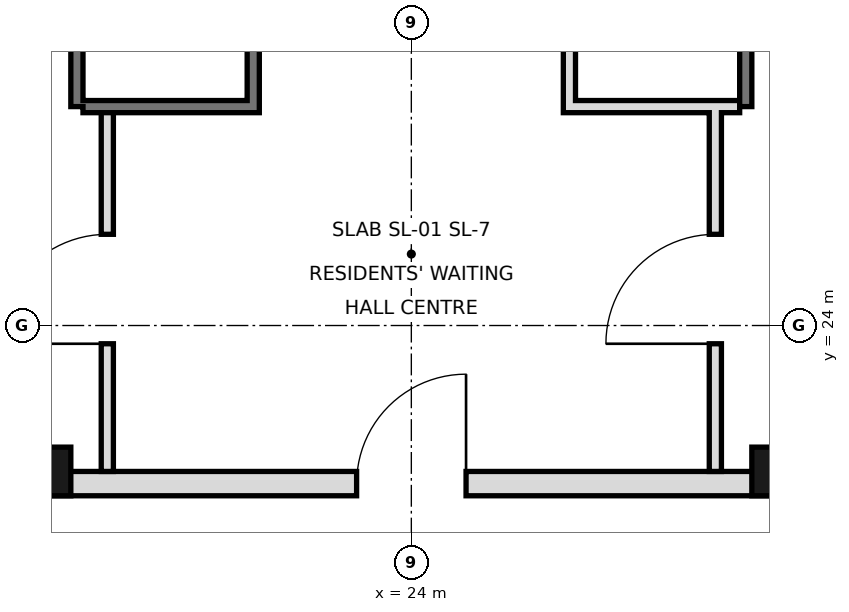
"""IFC4 building model, lengths in metres.
Left out: names, types, materials, properties, quantities, classifications, styles, units other than length and angle.
Written with IfcOpenShell. Run it as: python <this file> out.ifc"""

import sys

from ifc_helpers import new_model, si_unit, direction, frame, frame_2d, origin, origin_2d, place, context, subcontext, project, spatial, rectangle, hollow_rectangle, extrude, element, fill, save


model = new_model("IFC4")
c1 = context("Model", 3, precision=1e-05, world=origin(), true_north=direction((0.0, 1.0)))
c2 = subcontext(c1, "Body", "Model", "MODEL_VIEW")
j1 = project(units=[si_unit("LENGTHUNIT", "METRE"), si_unit("PLANEANGLEUNIT", "RADIAN")], contexts=[c1])
p1 = place(None, origin())
s1 = spatial("IfcSite", under=j1, at=p1, CompositionType="ELEMENT")
p2 = place(p1, origin())
s2 = spatial("IfcBuilding", under=s1, at=p2, CompositionType="ELEMENT")
p3 = place(p2, frame((0.0, 0.0, 126.8)))
s3 = spatial("IfcBuildingStorey", under=s2, at=p3, CompositionType="ELEMENT", Elevation=126.8)
for number, where, z_axis, x_axis in (
    (1, (18.0, 21.6, 0.0), (0.0, 0.0, 1.0), (1.0, 0.0, 0.0)),
    (2, (30.0, 21.6, 0.0), (0.0, 0.0, 1.0), (1.0, 0.0, 0.0)),
):
    element("IfcColumn", number, at=place(p3, frame(where, z_axis=z_axis, x_axis=x_axis)), inside=s3, PredefinedType="COLUMN", context=c2, shape_type="SweptSolid", body=[
        extrude(hollow_rectangle(XDim=0.8, YDim=0.8, WallThickness=0.05, at=origin_2d()), origin(), (0.0, 0.0, 1.0), 3.6),
    ])
for number, where, z_axis, x_axis in (
    (3, (18.5, 27.6, 0.0), (0.0, 0.0, 1.0), (0.0, 1.0, 0.0)),
    (4, (29.5, 27.6, 0.0), (0.0, 0.0, 1.0), (0.0, 1.0, 0.0)),
):
    element("IfcWall", number, at=place(p3, frame(where, z_axis=z_axis, x_axis=x_axis)), inside=s3, PredefinedType="SOLIDWALL", context=c2, shape_type="SweptSolid", body=[
        extrude(rectangle(XDim=17.5, YDim=0.2, at=frame_2d((8.75, 0.0))), origin(), (0.0, 0.0, 1.0), 3.42),
    ])
p4 = place(p3, frame((5.6, 21.4, 0.0), z_axis=(0.0, 0.0, 1.0), x_axis=(1.0, 0.0, 0.0)))
e5 = element("IfcWall", 5, at=p4, inside=s3, PredefinedType="SOLIDWALL", context=c2, shape_type="SweptSolid", body=[
    extrude(rectangle(XDim=36.8, YDim=0.4, at=frame_2d((18.4, 0.0))), origin(), (0.0, 0.0, 1.0), 3.42),
])
p5 = place(p4, frame((8.5, 0.0, 0.0)))
e6 = element("IfcOpeningElement", 6, at=p5, cuts=e5, PredefinedType="OPENING", context=c2, shape_type="SweptSolid", body=[
    extrude(rectangle(XDim=1.8, YDim=2.1, at=frame_2d((0.9, 1.05))), frame((0.0, 0.21, 0.0), z_axis=(0.0, -1.0, 0.0), x_axis=(1.0, 0.0, 0.0)), (0.0, 0.0, 1.0), 0.42),
])
p6 = place(p4, frame((17.5, 0.0, 0.0)))
e7 = element("IfcOpeningElement", 7, at=p6, cuts=e5, PredefinedType="OPENING", context=c2, shape_type="SweptSolid", body=[
    extrude(rectangle(XDim=1.8, YDim=2.1, at=frame_2d((0.9, 1.05))), frame((0.0, 0.21, 0.0), z_axis=(0.0, -1.0, 0.0), x_axis=(1.0, 0.0, 0.0)), (0.0, 0.0, 1.0), 0.42),
])
p7 = place(p4, frame((26.5, 0.0, 0.0)))
e8 = element("IfcOpeningElement", 8, at=p7, cuts=e5, PredefinedType="OPENING", context=c2, shape_type="SweptSolid", body=[
    extrude(rectangle(XDim=1.8, YDim=2.1, at=frame_2d((0.9, 1.05))), frame((0.0, 0.21, 0.0), z_axis=(0.0, -1.0, 0.0), x_axis=(1.0, 0.0, 0.0)), (0.0, 0.0, 1.0), 0.42),
])
p8 = place(p4, frame((4.5, 0.0, 0.0)))
e9 = element("IfcOpeningElement", 9, at=p8, cuts=e5, PredefinedType="OPENING", context=c2, shape_type="SweptSolid", body=[
    extrude(rectangle(XDim=1.2, YDim=2.1, at=frame_2d((0.6, 1.05))), frame((0.0, 0.21, 0.0), z_axis=(0.0, -1.0, 0.0), x_axis=(1.0, 0.0, 0.0)), (0.0, 0.0, 1.0), 0.42),
])
p9 = place(p4, frame((31.1, 0.0, 0.0)))
e10 = element("IfcOpeningElement", 10, at=p9, cuts=e5, PredefinedType="OPENING", context=c2, shape_type="SweptSolid", body=[
    extrude(rectangle(XDim=1.2, YDim=2.1, at=frame_2d((0.6, 1.05))), frame((0.0, 0.21, 0.0), z_axis=(0.0, -1.0, 0.0), x_axis=(1.0, 0.0, 0.0)), (0.0, 0.0, 1.0), 0.42),
])
p10 = place(p3, frame((19.0, 21.6, 0.0), z_axis=(0.0, 0.0, 1.0), x_axis=(0.0, 1.0, 0.0)))
e11 = element("IfcWall", 11, at=p10, inside=s3, PredefinedType="PARTITIONING", context=c2, shape_type="SweptSolid", body=[
    extrude(rectangle(XDim=6.0, YDim=0.2, at=frame_2d((3.0, 0.0))), origin(), (0.0, 0.0, 1.0), 3.42),
])
p11 = place(p10, frame((2.1, 0.0, 0.0)))
e12 = element("IfcOpeningElement", 12, at=p11, cuts=e11, PredefinedType="OPENING", context=c2, shape_type="SweptSolid", body=[
    extrude(rectangle(XDim=1.8, YDim=2.1, at=frame_2d((0.9, 1.05))), frame((0.0, 0.11, 0.0), z_axis=(0.0, -1.0, 0.0), x_axis=(1.0, 0.0, 0.0)), (0.0, 0.0, 1.0), 0.22),
])
p12 = place(p3, frame((29.0, 21.6, 0.0), z_axis=(0.0, 0.0, 1.0), x_axis=(0.0, 1.0, 0.0)))
e13 = element("IfcWall", 13, at=p12, inside=s3, PredefinedType="PARTITIONING", context=c2, shape_type="SweptSolid", body=[
    extrude(rectangle(XDim=6.0, YDim=0.2, at=frame_2d((3.0, 0.0))), origin(), (0.0, 0.0, 1.0), 3.42),
])
p13 = place(p12, frame((2.1, 0.0, 0.0)))
e14 = element("IfcOpeningElement", 14, at=p13, cuts=e13, PredefinedType="OPENING", context=c2, shape_type="SweptSolid", body=[
    extrude(rectangle(XDim=1.8, YDim=2.1, at=frame_2d((0.9, 1.05))), frame((0.0, 0.11, 0.0), z_axis=(0.0, -1.0, 0.0), x_axis=(1.0, 0.0, 0.0)), (0.0, 0.0, 1.0), 0.22),
])
p14 = place(p3, frame((21.4, 27.5, 0.0), z_axis=(0.0, 0.0, 1.0), x_axis=(0.0, 1.0, 0.0)))
e15 = element("IfcWall", 15, at=p14, inside=s3, PredefinedType="SOLIDWALL", context=c2, shape_type="SweptSolid", body=[
    extrude(rectangle(XDim=17.5, YDim=0.2, at=frame_2d((8.75, 0.0))), origin(), (0.0, 0.0, 1.0), 3.42),
])
p15 = place(p14, frame((16.2, 0.0, 0.0)))
e16 = element("IfcOpeningElement", 16, at=p15, cuts=e15, PredefinedType="OPENING", context=c2, shape_type="SweptSolid", body=[
    extrude(rectangle(XDim=1.0, YDim=2.1, at=frame_2d((0.5, 1.05))), frame((0.0, 0.11, 0.0), z_axis=(0.0, -1.0, 0.0), x_axis=(1.0, 0.0, 0.0)), (0.0, 0.0, 1.0), 0.22),
])
p16 = place(p14, frame((7.4, 0.0, 0.0)))
e17 = element("IfcOpeningElement", 17, at=p16, cuts=e15, PredefinedType="OPENING", context=c2, shape_type="SweptSolid", body=[
    extrude(rectangle(XDim=0.9, YDim=2.1, at=frame_2d((0.45, 1.05))), frame((0.0, 0.11, 0.0), z_axis=(0.0, -1.0, 0.0), x_axis=(1.0, 0.0, 0.0)), (0.0, 0.0, 1.0), 0.22),
])
p17 = place(p3, frame((26.6, 27.5, 0.0), z_axis=(0.0, 0.0, 1.0), x_axis=(0.0, 1.0, 0.0)))
e18 = element("IfcWall", 18, at=p17, inside=s3, PredefinedType="SOLIDWALL", context=c2, shape_type="SweptSolid", body=[
    extrude(rectangle(XDim=17.5, YDim=0.2, at=frame_2d((8.75, 0.0))), origin(), (0.0, 0.0, 1.0), 3.42),
])
p18 = place(p17, frame((4.3, 0.0, 0.0)))
e19 = element("IfcOpeningElement", 19, at=p18, cuts=e18, PredefinedType="OPENING", context=c2, shape_type="SweptSolid", body=[
    extrude(rectangle(XDim=0.9, YDim=2.1, at=frame_2d((0.45, 1.05))), frame((0.0, 0.11, 0.0), z_axis=(0.0, -1.0, 0.0), x_axis=(1.0, 0.0, 0.0)), (0.0, 0.0, 1.0), 0.22),
])
p19 = place(p17, frame((10.35, 0.0, 0.0)))
e20 = element("IfcOpeningElement", 20, at=p19, cuts=e18, PredefinedType="OPENING", context=c2, shape_type="SweptSolid", body=[
    extrude(rectangle(XDim=1.0, YDim=2.1, at=frame_2d((0.5, 1.05))), frame((0.0, 0.11, 0.0), z_axis=(0.0, -1.0, 0.0), x_axis=(1.0, 0.0, 0.0)), (0.0, 0.0, 1.0), 0.22),
])
p20 = place(p17, frame((15.475, 0.0, 0.0)))
e21 = element("IfcOpeningElement", 21, at=p20, cuts=e18, PredefinedType="OPENING", context=c2, shape_type="SweptSolid", body=[
    extrude(rectangle(XDim=1.0, YDim=2.1, at=frame_2d((0.5, 1.05))), frame((0.0, 0.11, 0.0), z_axis=(0.0, -1.0, 0.0), x_axis=(1.0, 0.0, 0.0)), (0.0, 0.0, 1.0), 0.22),
])
for number, where, z_axis, x_axis in (
    (22, (18.6, 27.6, 0.0), (0.0, 0.0, 1.0), (1.0, 0.0, 0.0)),
    (23, (26.7, 27.6, 0.0), (0.0, 0.0, 1.0), (1.0, 0.0, 0.0)),
):
    element("IfcWall", number, at=place(p3, frame(where, z_axis=z_axis, x_axis=x_axis)), inside=s3, PredefinedType="SOLIDWALL", context=c2, shape_type="SweptSolid", body=[
        extrude(rectangle(XDim=2.7, YDim=0.2, at=frame_2d((1.35, 0.0))), origin(), (0.0, 0.0, 1.0), 3.42),
    ])
p21 = place(p11, origin())
e24 = element("IfcDoor", 24, at=p21, inside=s3, OperationType="SINGLE_SWING_LEFT", PredefinedType="DOOR", context=c2, shape_type="SweptSolid", body=[
    extrude(rectangle(XDim=1.8, YDim=2.1, at=frame_2d((0.9, 1.05))), frame((0.0, 0.025, 0.0), z_axis=(0.0, -1.0, 0.0), x_axis=(1.0, 0.0, 0.0)), (0.0, 0.0, 1.0), 0.05),
])
fill(e12, e24)
p22 = place(p6, frame((1.8, 0.0, 0.0), z_axis=(0.0, 0.0, 1.0), x_axis=(-1.0, 0.0, 0.0)))
e25 = element("IfcDoor", 25, at=p22, inside=s3, OperationType="SINGLE_SWING_LEFT", PredefinedType="DOOR", context=c2, shape_type="SweptSolid", body=[
    extrude(rectangle(XDim=1.8, YDim=2.1, at=frame_2d((0.9, 1.05))), frame((0.0, 0.025, 0.0), z_axis=(0.0, -1.0, 0.0), x_axis=(1.0, 0.0, 0.0)), (0.0, 0.0, 1.0), 0.05),
])
fill(e7, e25)
p23 = place(p13, origin())
e26 = element("IfcDoor", 26, at=p23, inside=s3, OperationType="SINGLE_SWING_LEFT", PredefinedType="DOOR", context=c2, shape_type="SweptSolid", body=[
    extrude(rectangle(XDim=1.8, YDim=2.1, at=frame_2d((0.9, 1.05))), frame((0.0, 0.025, 0.0), z_axis=(0.0, -1.0, 0.0), x_axis=(1.0, 0.0, 0.0)), (0.0, 0.0, 1.0), 0.05),
])
fill(e14, e26)
save(model, sys.argv[1])
